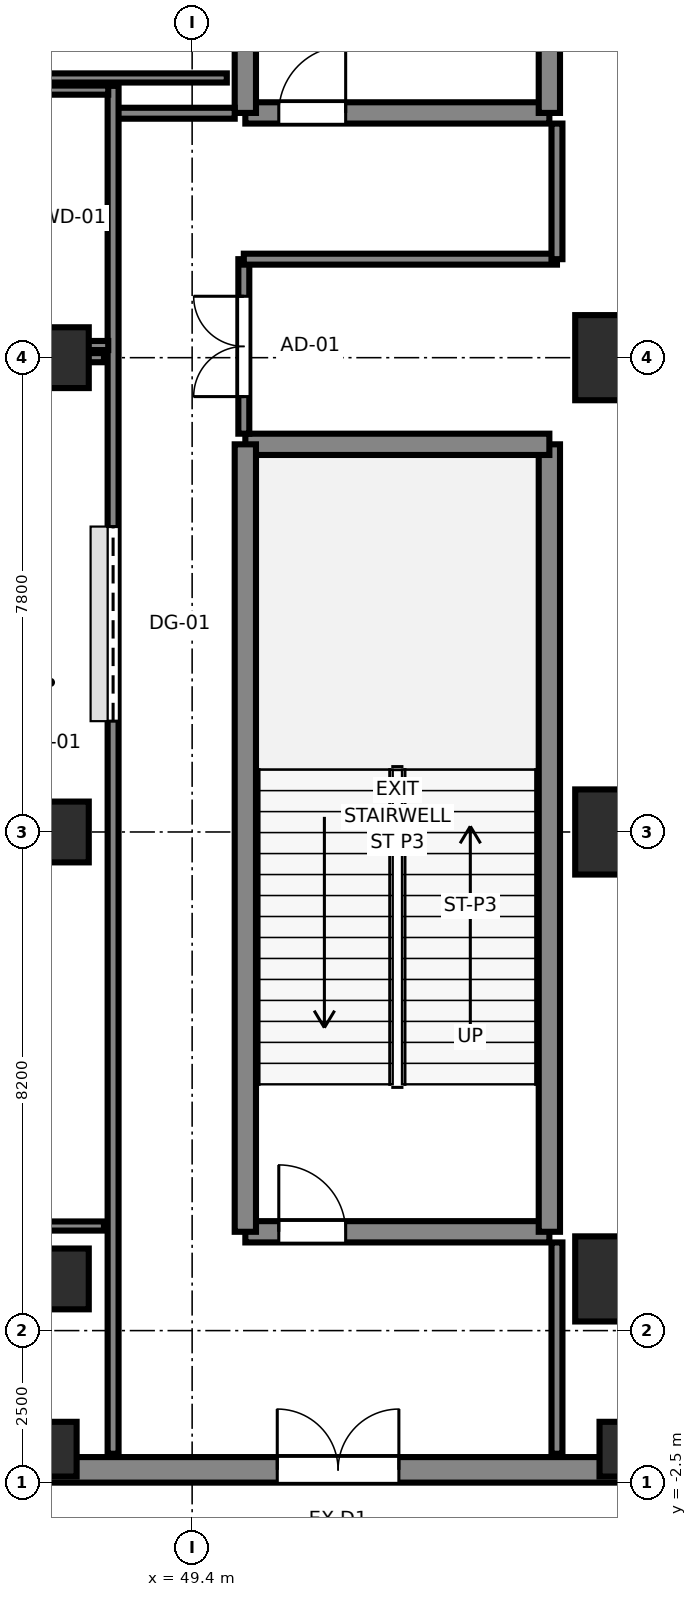
"""IFC4 building model, lengths in metres.
Left out: names, types, materials, properties, quantities, classifications, styles, units other than length and angle.
Written with IfcOpenShell. Run it as: python <this file> out.ifc"""

import sys

from ifc_helpers import new_model, si_unit, direction, frame, frame_2d, origin, origin_2d, place, context, subcontext, project, spatial, rectangle, extrude, source, transform, mapped, element, fill, save


model = new_model("IFC4")
c1 = context("Model", 3, precision=1e-05, world=origin(), true_north=direction((0.0, 1.0)))
c2 = subcontext(c1, "Body", "Model", "MODEL_VIEW")
j1 = project(units=[si_unit("LENGTHUNIT", "METRE"), si_unit("PLANEANGLEUNIT", "RADIAN")], contexts=[c1])
p1 = place(None, origin())
s1 = spatial("IfcSite", under=j1, at=p1, CompositionType="ELEMENT")
p2 = place(p1, origin())
s2 = spatial("IfcBuilding", under=s1, at=p2, CompositionType="ELEMENT")
p3 = place(p2, origin())
s3 = spatial("IfcBuildingStorey", under=s2, at=p3, CompositionType="ELEMENT", Elevation=0.0)
p4 = place(p3, frame((50.275, 1.625, 0.0), z_axis=(0.0, 0.0, 1.0), x_axis=(1.0, 0.0, 0.0)))
e1 = element("IfcWall", 1, at=p4, inside=s3, PredefinedType="SHEAR", context=c2, shape_type="SweptSolid", body=[
    extrude(rectangle(XDim=5.0, YDim=0.35, at=frame_2d((2.5, 0.0))), origin(), (0.0, 0.0, 1.0), 6.0),
])
p5 = place(p4, frame((1.65, 0.0, 0.0), z_axis=(0.0, 0.0, 1.0), x_axis=(-1.0, 0.0, 0.0)))
e2 = element("IfcOpeningElement", 2, at=p5, cuts=e1, PredefinedType="OPENING", context=c2, shape_type="SweptSolid", body=[
    extrude(rectangle(XDim=1.1, YDim=2.12, at=frame_2d((0.55, 1.06))), frame((0.0, 0.185, 0.0), z_axis=(0.0, -1.0, 0.0), x_axis=(1.0, 0.0, 0.0)), (0.0, 0.0, 1.0), 0.37),
])
p6 = place(p3, frame((55.275, 1.625, 0.0), z_axis=(0.0, 0.0, 1.0), x_axis=(0.0, 1.0, 0.0)))
e3 = element("IfcWall", 3, at=p6, inside=s3, PredefinedType="SHEAR", context=c2, shape_type="SweptSolid", body=[
    extrude(rectangle(XDim=12.95, YDim=0.35, at=frame_2d((6.475, 0.0))), origin(), (0.0, 0.0, 1.0), 6.0),
])
p7 = place(p3, frame((55.275, 14.575, 0.0), z_axis=(0.0, 0.0, 1.0), x_axis=(-1.0, 0.0, 0.0)))
e4 = element("IfcWall", 4, at=p7, inside=s3, PredefinedType="SHEAR", context=c2, shape_type="SweptSolid", body=[
    extrude(rectangle(XDim=5.0, YDim=0.35, at=frame_2d((2.5, 0.0))), origin(), (0.0, 0.0, 1.0), 6.0),
])
p8 = place(p3, frame((50.275, 14.575, 0.0), z_axis=(0.0, 0.0, 1.0), x_axis=(0.0, -1.0, 0.0)))
e5 = element("IfcWall", 5, at=p8, inside=s3, PredefinedType="SHEAR", context=c2, shape_type="SweptSolid", body=[
    extrude(rectangle(XDim=12.95, YDim=0.35, at=frame_2d((6.475, 0.0))), origin(), (0.0, 0.0, 1.0), 6.0),
])
p9 = place(p3, frame((50.275, 20.025, 0.0), z_axis=(0.0, 0.0, 1.0), x_axis=(1.0, 0.0, 0.0)))
e6 = element("IfcWall", 6, at=p9, inside=s3, PredefinedType="SHEAR", context=c2, shape_type="SweptSolid", body=[
    extrude(rectangle(XDim=5.0, YDim=0.35, at=frame_2d((2.5, 0.0))), origin(), (0.0, 0.0, 1.0), 6.0),
])
p10 = place(p9, frame((1.65, 0.0, 0.0), z_axis=(0.0, 0.0, 1.0), x_axis=(-1.0, 0.0, 0.0)))
e7 = element("IfcOpeningElement", 7, at=p10, cuts=e6, PredefinedType="OPENING", context=c2, shape_type="SweptSolid", body=[
    extrude(rectangle(XDim=1.1, YDim=2.12, at=frame_2d((0.55, 1.06))), frame((0.0, 0.185, 0.0), z_axis=(0.0, -1.0, 0.0), x_axis=(1.0, 0.0, 0.0)), (0.0, 0.0, 1.0), 0.37),
])
for number, where, z_axis, x_axis in (
    (8, (55.275, 20.025, 0.0), (0.0, 0.0, 1.0), (0.0, 1.0, 0.0)),
    (9, (50.275, 32.975, 0.0), (0.0, 0.0, 1.0), (0.0, -1.0, 0.0)),
):
    element("IfcWall", number, at=place(p3, frame(where, z_axis=z_axis, x_axis=x_axis)), inside=s3, PredefinedType="SHEAR", context=c2, shape_type="SweptSolid", body=[
        extrude(rectangle(XDim=12.95, YDim=0.35, at=frame_2d((6.475, 0.0))), origin(), (0.0, 0.0, 1.0), 6.0),
    ])
m1 = source(origin(), c2, "Body", "SweptSolid", [
    extrude(rectangle(XDim=1.0, YDim=1.0, at=origin_2d()), origin(), (0.0, 0.0, 1.0), 6.0),
])
p11 = place(p3, frame((47.2, 0.85, 0.0), z_axis=(0.0, 0.0, 1.0), x_axis=(1.0, 0.0, 0.0)))
e10 = element("IfcColumn", 10, at=p11, inside=s3, PredefinedType="COLUMN", context=c2, shape_type="MappedRepresentation", body=[
    mapped(m1, transform((0.0, 0.0, 0.0), x_axis=(1.0, 0.0, 0.0), y_axis=(0.0, 1.0, 0.0), z_axis=(0.0, 0.0, 1.0), scale=1.0)),
])
m2 = source(origin(), c2, "Body", "SweptSolid", [
    extrude(rectangle(XDim=1.4, YDim=1.4, at=origin_2d()), origin(), (0.0, 0.0, 1.0), 6.0),
])
p12 = place(p3, frame((56.4, 0.85, 0.0), z_axis=(0.0, 0.0, 1.0), x_axis=(1.0, 0.0, 0.0)))
e11 = element("IfcColumn", 11, at=p12, inside=s3, PredefinedType="COLUMN", context=c2, shape_type="MappedRepresentation", body=[
    mapped(m2, transform((0.0, 0.0, 0.0), x_axis=(1.0, 0.0, 0.0), y_axis=(0.0, 1.0, 0.0), z_axis=(0.0, 0.0, 1.0), scale=1.0)),
])
p13 = place(p3, frame((47.2, 8.2, 0.0), z_axis=(0.0, 0.0, 1.0), x_axis=(1.0, 0.0, 0.0)))
e12 = element("IfcColumn", 12, at=p13, inside=s3, PredefinedType="COLUMN", context=c2, shape_type="MappedRepresentation", body=[
    mapped(m1, transform((0.0, 0.0, 0.0), x_axis=(1.0, 0.0, 0.0), y_axis=(0.0, 1.0, 0.0), z_axis=(0.0, 0.0, 1.0), scale=1.0)),
])
p14 = place(p3, frame((56.4, 8.2, 0.0), z_axis=(0.0, 0.0, 1.0), x_axis=(1.0, 0.0, 0.0)))
e13 = element("IfcColumn", 13, at=p14, inside=s3, PredefinedType="COLUMN", context=c2, shape_type="MappedRepresentation", body=[
    mapped(m2, transform((0.0, 0.0, 0.0), x_axis=(1.0, 0.0, 0.0), y_axis=(0.0, 1.0, 0.0), z_axis=(0.0, 0.0, 1.0), scale=1.0)),
])
p15 = place(p3, frame((47.2, 16.0, 0.0), z_axis=(0.0, 0.0, 1.0), x_axis=(1.0, 0.0, 0.0)))
e14 = element("IfcColumn", 14, at=p15, inside=s3, PredefinedType="COLUMN", context=c2, shape_type="MappedRepresentation", body=[
    mapped(m1, transform((0.0, 0.0, 0.0), x_axis=(1.0, 0.0, 0.0), y_axis=(0.0, 1.0, 0.0), z_axis=(0.0, 0.0, 1.0), scale=1.0)),
])
p16 = place(p3, frame((56.4, 16.0, 0.0), z_axis=(0.0, 0.0, 1.0), x_axis=(1.0, 0.0, 0.0)))
e15 = element("IfcColumn", 15, at=p16, inside=s3, PredefinedType="COLUMN", context=c2, shape_type="MappedRepresentation", body=[
    mapped(m2, transform((0.0, 0.0, 0.0), x_axis=(1.0, 0.0, 0.0), y_axis=(0.0, 1.0, 0.0), z_axis=(0.0, 0.0, 1.0), scale=1.0)),
])
m3 = source(origin(), c2, "Body", "SweptSolid", [
    extrude(rectangle(XDim=0.6, YDim=0.9, at=origin_2d()), origin(), (0.0, 0.0, 1.0), 6.0),
])
for number, where, z_axis, x_axis in (
    (16, (47.2, -1.95, 0.0), (0.0, 0.0, 1.0), (1.0, 0.0, 0.0)),
    (17, (56.4, -1.95, 0.0), (0.0, 0.0, 1.0), (1.0, 0.0, 0.0)),
):
    element("IfcColumn", number, at=place(p3, frame(where, z_axis=z_axis, x_axis=x_axis)), inside=s3, PredefinedType="PILASTER", context=c2, shape_type="MappedRepresentation", body=[
        mapped(m3, transform((0.0, 0.0, 0.0), x_axis=(1.0, 0.0, 0.0), y_axis=(0.0, 1.0, 0.0), z_axis=(0.0, 0.0, 1.0), scale=1.0)),
    ])
p17 = place(p3, frame((37.59, -2.29, 0.0), z_axis=(0.0, 0.0, 1.0), x_axis=(1.0, 0.0, 0.0)))
e18 = element("IfcWall", 18, at=p17, inside=s3, PredefinedType="SOLIDWALL", context=c2, shape_type="SweptSolid", body=[
    extrude(rectangle(XDim=27.6, YDim=0.42, at=frame_2d((13.8, 0.0))), origin(), (0.0, 0.0, 1.0), 5.74),
])
p18 = place(p17, frame((6.11, 0.0, 0.0), z_axis=(0.0, 0.0, 1.0), x_axis=(-1.0, 0.0, 0.0)))
e19 = element("IfcOpeningElement", 19, at=p18, cuts=e18, PredefinedType="OPENING", context=c2, shape_type="SweptSolid", body=[
    extrude(rectangle(XDim=2.0, YDim=2.25, at=frame_2d((1.0, 1.125))), frame((0.0, 0.22, 0.0), z_axis=(0.0, -1.0, 0.0), x_axis=(1.0, 0.0, 0.0)), (0.0, 0.0, 1.0), 0.44),
])
p19 = place(p17, frame((15.21, 0.0, 0.0), z_axis=(0.0, 0.0, 1.0), x_axis=(-1.0, 0.0, 0.0)))
e20 = element("IfcOpeningElement", 20, at=p19, cuts=e18, PredefinedType="OPENING", context=c2, shape_type="SweptSolid", body=[
    extrude(rectangle(XDim=2.0, YDim=2.25, at=frame_2d((1.0, 1.125))), frame((0.0, 0.22, 0.0), z_axis=(0.0, -1.0, 0.0), x_axis=(1.0, 0.0, 0.0)), (0.0, 0.0, 1.0), 0.44),
])
p20 = place(p17, frame((24.01, 0.0, 0.0), z_axis=(0.0, 0.0, 1.0), x_axis=(-1.0, 0.0, 0.0)))
e21 = element("IfcOpeningElement", 21, at=p20, cuts=e18, PredefinedType="OPENING", context=c2, shape_type="SweptSolid", body=[
    extrude(rectangle(XDim=2.0, YDim=2.25, at=frame_2d((1.0, 1.125))), frame((0.0, 0.22, 0.0), z_axis=(0.0, -1.0, 0.0), x_axis=(1.0, 0.0, 0.0)), (0.0, 0.0, 1.0), 0.44),
])
p21 = place(p3, frame((55.4, -2.025, 0.0), z_axis=(0.0, 0.0, 1.0), x_axis=(0.0, 1.0, 0.0)))
e22 = element("IfcWall", 22, at=p21, inside=s3, PredefinedType="PARTITIONING", context=c2, shape_type="SweptSolid", body=[
    extrude(rectangle(XDim=3.475, YDim=0.18, at=frame_2d((1.737, 0.0))), origin(), (0.0, 0.0, 1.0), 5.74),
])
p22 = place(p3, frame((50.25, 14.75, 0.0), z_axis=(0.0, 0.0, 1.0), x_axis=(0.0, 1.0, 0.0)))
e23 = element("IfcWall", 23, at=p22, inside=s3, PredefinedType="PARTITIONING", context=c2, shape_type="SweptSolid", body=[
    extrude(rectangle(XDim=2.87, YDim=0.18, at=frame_2d((1.435, 0.0))), origin(), (0.0, 0.0, 1.0), 5.74),
])
p23 = place(p22, frame((0.61, 0.0, 0.0)))
e24 = element("IfcOpeningElement", 24, at=p23, cuts=e23, PredefinedType="OPENING", context=c2, shape_type="SweptSolid", body=[
    extrude(rectangle(XDim=1.65, YDim=2.15, at=frame_2d((0.825, 1.075))), frame((0.0, 0.1, 0.0), z_axis=(0.0, -1.0, 0.0), x_axis=(1.0, 0.0, 0.0)), (0.0, 0.0, 1.0), 0.2),
])
p24 = place(p3, frame((50.25, 17.62, 0.0), z_axis=(0.0, 0.0, 1.0), x_axis=(1.0, 0.0, 0.0)))
e25 = element("IfcWall", 25, at=p24, inside=s3, PredefinedType="PARTITIONING", context=c2, shape_type="SweptSolid", body=[
    extrude(rectangle(XDim=5.15, YDim=0.18, at=frame_2d((2.575, 0.0))), origin(), (0.0, 0.0, 1.0), 5.74),
])
p25 = place(p3, frame((55.4, 17.62, 0.0), z_axis=(0.0, 0.0, 1.0), x_axis=(0.0, 1.0, 0.0)))
e26 = element("IfcWall", 26, at=p25, inside=s3, PredefinedType="PARTITIONING", context=c2, shape_type="SweptSolid", body=[
    extrude(rectangle(XDim=2.23, YDim=0.18, at=frame_2d((1.115, 0.0))), origin(), (0.0, 0.0, 1.0), 5.74),
])
p26 = place(p3, frame((48.1, 20.02, 0.0), z_axis=(0.0, 0.0, 1.0), x_axis=(1.0, 0.0, 0.0)))
e27 = element("IfcWall", 27, at=p26, inside=s3, PredefinedType="PARTITIONING", context=c2, shape_type="SweptSolid", body=[
    extrude(rectangle(XDim=2.0, YDim=0.18, at=frame_2d((1.0, 0.0))), origin(), (0.0, 0.0, 1.0), 5.74),
])
p27 = place(p3, frame((48.1, -2.025, 0.0), z_axis=(0.0, 0.0, 1.0), x_axis=(0.0, 1.0, 0.0)))
e28 = element("IfcWall", 28, at=p27, inside=s3, PredefinedType="PARTITIONING", context=c2, shape_type="SweptSolid", body=[
    extrude(rectangle(XDim=22.495, YDim=0.18, at=frame_2d((11.248, 0.0))), origin(), (0.0, 0.0, 1.0), 5.74),
])
p28 = place(p27, frame((12.048, 0.0, 0.0)))
e29 = element("IfcOpeningElement", 29, at=p28, cuts=e28, PredefinedType="OPENING", context=c2, shape_type="SweptSolid", body=[
    extrude(rectangle(XDim=3.2, YDim=2.8, at=frame_2d((1.6, 1.4))), frame((0.0, 0.1, 0.0), z_axis=(0.0, -1.0, 0.0), x_axis=(1.0, 0.0, 0.0)), (0.0, 0.0, 1.0), 0.2),
])
p29 = place(p3, frame((46.28, 16.2, 0.0), z_axis=(0.0, 0.0, 1.0), x_axis=(1.0, 0.0, 0.0)))
e30 = element("IfcWall", 30, at=p29, inside=s3, PredefinedType="PARTITIONING", context=c2, shape_type="SweptSolid", body=[
    extrude(rectangle(XDim=1.74, YDim=0.15, at=frame_2d((0.87, 0.0))), origin(), (0.0, 0.0, 1.0), 4.914),
])
p30 = place(p3, frame((46.28, 20.4, 0.0), z_axis=(0.0, 0.0, 1.0), x_axis=(1.0, 0.0, 0.0)))
e31 = element("IfcWall", 31, at=p30, inside=s3, PredefinedType="PARTITIONING", context=c2, shape_type="SweptSolid", body=[
    extrude(rectangle(XDim=1.74, YDim=0.15, at=frame_2d((0.87, 0.0))), origin(), (0.0, 0.0, 1.0), 5.74),
])
p31 = place(p3, frame((46.33, 20.6, 0.0), z_axis=(0.0, 0.0, 1.0), x_axis=(1.0, 0.0, 0.0)))
e32 = element("IfcWall", 32, at=p31, inside=s3, PredefinedType="PARTITIONING", context=c2, shape_type="SweptSolid", body=[
    extrude(rectangle(XDim=3.64, YDim=0.15, at=frame_2d((1.82, 0.0))), origin(), (0.0, 0.0, 1.0), 5.74),
])
p32 = place(p3, frame((46.35, 1.72, 0.0), z_axis=(0.0, 0.0, 1.0), x_axis=(1.0, 0.0, 0.0)))
e33 = element("IfcWall", 33, at=p32, inside=s3, PredefinedType="PARTITIONING", context=c2, shape_type="SweptSolid", body=[
    extrude(rectangle(XDim=1.6, YDim=0.15, at=frame_2d((0.8, 0.0))), origin(), (0.0, 0.0, 1.0), 5.74),
])
p33 = place(p3, frame((46.35, 16.0, 0.0), z_axis=(0.0, 0.0, 1.0), x_axis=(1.0, 0.0, 0.0)))
e34 = element("IfcWall", 34, at=p33, inside=s3, PredefinedType="PARTITIONING", context=c2, shape_type="SweptSolid", body=[
    extrude(rectangle(XDim=1.6, YDim=0.15, at=frame_2d((0.8, 0.0))), origin(), (0.0, 0.0, 1.0), 4.914),
])
m4 = source(origin(), c2, "Body", "SweptSolid", [
    extrude(rectangle(XDim=2.0, YDim=2.25, at=frame_2d((1.0, 1.125))), frame((0.0, 0.025, 0.0), z_axis=(0.0, -1.0, 0.0), x_axis=(1.0, 0.0, 0.0)), (0.0, 0.0, 1.0), 0.05),
])
p34 = place(p19, origin())
e35 = element("IfcDoor", 35, at=p34, inside=s3, OperationType="DOUBLE_DOOR_SINGLE_SWING", PredefinedType="DOOR", context=c2, shape_type="MappedRepresentation", body=[
    mapped(m4, transform((0.0, 0.0, 0.0), x_axis=(1.0, 0.0, 0.0), y_axis=(0.0, 1.0, 0.0), z_axis=(0.0, 0.0, 1.0), scale=1.0)),
])
fill(e20, e35)
m5 = source(origin(), c2, "Body", "SweptSolid", [
    extrude(rectangle(XDim=1.1, YDim=2.12, at=frame_2d((0.55, 1.06))), frame((0.0, 0.025, 0.0), z_axis=(0.0, -1.0, 0.0), x_axis=(1.0, 0.0, 0.0)), (0.0, 0.0, 1.0), 0.05),
])
p35 = place(p5, origin())
e36 = element("IfcDoor", 36, at=p35, inside=s3, OperationType="SINGLE_SWING_LEFT", PredefinedType="DOOR", context=c2, shape_type="MappedRepresentation", body=[
    mapped(m5, transform((0.0, 0.0, 0.0), x_axis=(1.0, 0.0, 0.0), y_axis=(0.0, 1.0, 0.0), z_axis=(0.0, 0.0, 1.0), scale=1.0)),
])
fill(e2, e36)
p36 = place(p10, origin())
e37 = element("IfcDoor", 37, at=p36, inside=s3, OperationType="SINGLE_SWING_RIGHT", PredefinedType="DOOR", context=c2, shape_type="MappedRepresentation", body=[
    mapped(m5, transform((0.0, 0.0, 0.0), x_axis=(1.0, 0.0, 0.0), y_axis=(0.0, 1.0, 0.0), z_axis=(0.0, 0.0, 1.0), scale=1.0)),
])
fill(e7, e37)
m6 = source(origin(), c2, "Body", "SweptSolid", [
    extrude(rectangle(XDim=1.65, YDim=2.15, at=frame_2d((0.825, 1.075))), frame((0.0, 0.025, 0.0), z_axis=(0.0, -1.0, 0.0), x_axis=(1.0, 0.0, 0.0)), (0.0, 0.0, 1.0), 0.05),
])
p37 = place(p23, origin())
e38 = element("IfcDoor", 38, at=p37, inside=s3, OperationType="DOUBLE_DOOR_SINGLE_SWING", PredefinedType="DOOR", context=c2, shape_type="MappedRepresentation", body=[
    mapped(m6, transform((0.0, 0.0, 0.0), x_axis=(1.0, 0.0, 0.0), y_axis=(0.0, 1.0, 0.0), z_axis=(0.0, 0.0, 1.0), scale=1.0)),
])
fill(e24, e38)
m7 = source(origin(), c2, "Body", "SweptSolid", [
    extrude(rectangle(XDim=3.2, YDim=2.8, at=frame_2d((1.6, 1.4))), frame((0.0, 0.025, 0.0), z_axis=(0.0, -1.0, 0.0), x_axis=(1.0, 0.0, 0.0)), (0.0, 0.0, 1.0), 0.05),
])
p38 = place(p28, origin())
e39 = element("IfcDoor", 39, at=p38, inside=s3, OperationType="ROLLINGUP", PredefinedType="GATE", context=c2, shape_type="MappedRepresentation", body=[
    mapped(m7, transform((0.0, 0.0, 0.0), x_axis=(1.0, 0.0, 0.0), y_axis=(0.0, 1.0, 0.0), z_axis=(0.0, 0.0, 1.0), scale=1.0)),
])
fill(e29, e39)
save(model, sys.argv[1])
